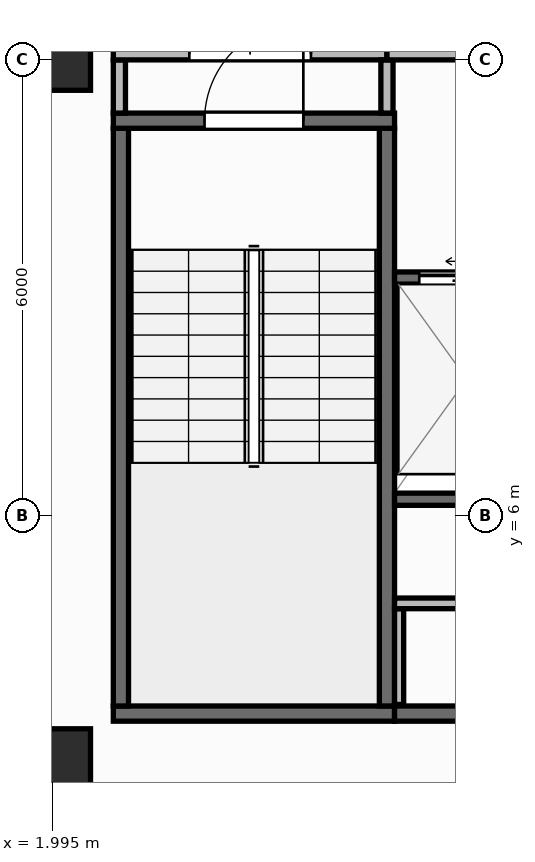
"""IFC4 building model, lengths in metres.
Left out: names, types, materials, properties, quantities, classifications, styles, units other than length and angle.
Written with IfcOpenShell. Run it as: python <this file> out.ifc"""

import sys

from ifc_helpers import new_model, si_unit, direction, frame, frame_2d, origin, origin_2d, place, context, subcontext, project, spatial, rectangle, extrude, element, fill, save


model = new_model("IFC4")
c1 = context("Model", 3, precision=1e-05, world=origin(), true_north=direction((0.0, 1.0)))
c2 = subcontext(c1, "Body", "Model", "MODEL_VIEW")
j1 = project(units=[si_unit("LENGTHUNIT", "METRE"), si_unit("PLANEANGLEUNIT", "RADIAN")], contexts=[c1])
p1 = place(None, origin())
s1 = spatial("IfcSite", under=j1, at=p1, CompositionType="ELEMENT")
p2 = place(p1, origin())
s2 = spatial("IfcBuilding", under=s1, at=p2, CompositionType="ELEMENT")
p3 = place(p2, frame((0.0, 0.0, 256.55)))
s3 = spatial("IfcBuildingStorey", under=s2, at=p3, CompositionType="ELEMENT", Elevation=256.55)
for number, where, z_axis, x_axis in (
    (1, (2.1, 2.8, 0.0), (0.0, 0.0, 1.0), (1.0, 0.0, 0.0)),
    (2, (2.1, 12.0, 0.0), (0.0, 0.0, 1.0), (1.0, 0.0, 0.0)),
):
    element("IfcColumn", number, at=place(p3, frame(where, z_axis=z_axis, x_axis=x_axis)), inside=s3, PredefinedType="COLUMN", context=c2, shape_type="SweptSolid", body=[
        extrude(rectangle(XDim=0.8, YDim=0.8, at=origin_2d()), origin(), (0.0, 0.0, 1.0), 3.95),
    ])
p4 = place(p3, frame((2.56, 0.173, 0.0), z_axis=(0.0, 0.0, 1.0), x_axis=(0.996798206282, 0.079958338856, 0.0)))
e3 = element("IfcWall", 3, at=p4, inside=s3, PredefinedType="STANDARD", context=c2, shape_type="SweptSolid", body=[
    extrude(rectangle(XDim=37.199, YDim=0.26, at=frame_2d((18.6, 0.0))), origin(), (0.0, 0.0, 1.0), 3.71),
])
p5 = place(p4, frame((17.4, 0.0, 0.9)))
e4 = element("IfcOpeningElement", 4, at=p5, cuts=e3, PredefinedType="OPENING", context=c2, shape_type="SweptSolid", body=[
    extrude(rectangle(XDim=2.4, YDim=1.65, at=frame_2d((1.2, 0.825))), frame((0.0, 0.14, 0.0), z_axis=(0.0, -1.0, 0.0), x_axis=(1.0, 0.0, 0.0)), (0.0, 0.0, 1.0), 0.28),
])
p6 = place(p3, frame((2.8, 3.4, 0.0), z_axis=(0.0, 0.0, 1.0), x_axis=(1.0, 0.0, 0.0)))
e5 = element("IfcWall", 5, at=p6, inside=s3, PredefinedType="SHEAR", context=c2, shape_type="SweptSolid", body=[
    extrude(rectangle(XDim=3.7, YDim=0.2, at=frame_2d((1.85, 0.0))), origin(), (0.0, 0.0, 1.0), 3.71),
])
for number, where, z_axis, x_axis in (
    (6, (2.9, 3.5, 0.0), (0.0, 0.0, 1.0), (0.0, 1.0, 0.0)),
    (7, (6.4, 3.5, 0.0), (0.0, 0.0, 1.0), (0.0, 1.0, 0.0)),
):
    element("IfcWall", number, at=place(p3, frame(where, z_axis=z_axis, x_axis=x_axis)), inside=s3, PredefinedType="SHEAR", context=c2, shape_type="SweptSolid", body=[
        extrude(rectangle(XDim=7.6, YDim=0.2, at=frame_2d((3.8, 0.0))), origin(), (0.0, 0.0, 1.0), 3.71),
    ])
p7 = place(p3, frame((2.8, 11.2, 0.0), z_axis=(0.0, 0.0, 1.0), x_axis=(1.0, 0.0, 0.0)))
e8 = element("IfcWall", 8, at=p7, inside=s3, PredefinedType="SHEAR", context=c2, shape_type="SweptSolid", body=[
    extrude(rectangle(XDim=3.7, YDim=0.2, at=frame_2d((1.85, 0.0))), origin(), (0.0, 0.0, 1.0), 3.71),
])
p8 = place(p7, frame((1.2, 0.0, 0.0)))
e9 = element("IfcOpeningElement", 9, at=p8, cuts=e8, PredefinedType="OPENING", context=c2, shape_type="SweptSolid", body=[
    extrude(rectangle(XDim=1.3, YDim=2.15, at=frame_2d((0.65, 1.075))), frame((0.0, 0.11, 0.0), z_axis=(0.0, -1.0, 0.0), x_axis=(1.0, 0.0, 0.0)), (0.0, 0.0, 1.0), 0.22),
])
p9 = place(p3, frame((6.5, 3.4, 0.0), z_axis=(0.0, 0.0, 1.0), x_axis=(1.0, 0.0, 0.0)))
e10 = element("IfcWall", 10, at=p9, inside=s3, PredefinedType="SHEAR", context=c2, shape_type="SweptSolid", body=[
    extrude(rectangle(XDim=13.7, YDim=0.2, at=frame_2d((6.85, 0.0))), origin(), (0.0, 0.0, 1.0), 3.71),
])
p10 = place(p3, frame((6.5, 6.22, 0.0), z_axis=(0.0, 0.0, 1.0), x_axis=(1.0, 0.0, 0.0)))
e11 = element("IfcWall", 11, at=p10, inside=s3, PredefinedType="SHEAR", context=c2, shape_type="SweptSolid", body=[
    extrude(rectangle(XDim=12.11, YDim=0.16, at=frame_2d((6.055, 0.0))), origin(), (0.0, 0.0, 1.0), 3.71),
])
p11 = place(p3, frame((6.5, 9.13, 0.0), z_axis=(0.0, 0.0, 1.0), x_axis=(1.0, 0.0, 0.0)))
e12 = element("IfcWall", 12, at=p11, inside=s3, PredefinedType="SHEAR", context=c2, shape_type="SweptSolid", body=[
    extrude(rectangle(XDim=1.975, YDim=0.16, at=frame_2d((0.988, 0.0))), origin(), (0.0, 0.0, 1.0), 3.71),
])
p12 = place(p11, frame((0.325, 0.0, 0.0)))
e13 = element("IfcOpeningElement", 13, at=p12, cuts=e12, PredefinedType="OPENING", context=c2, shape_type="SweptSolid", body=[
    extrude(rectangle(XDim=1.25, YDim=2.15, at=frame_2d((0.625, 1.075))), frame((0.0, 0.09, 0.0), z_axis=(0.0, -1.0, 0.0), x_axis=(1.0, 0.0, 0.0)), (0.0, 0.0, 1.0), 0.18),
])
p13 = place(p3, frame((6.56, 3.52, 0.0), z_axis=(0.0, 0.0, 1.0), x_axis=(0.0, 1.0, 0.0)))
e14 = element("IfcWall", 14, at=p13, inside=s3, PredefinedType="PARTITIONING", context=c2, shape_type="SweptSolid", body=[
    extrude(rectangle(XDim=1.26, YDim=0.12, at=frame_2d((0.63, 0.0))), origin(), (0.0, 0.0, 1.0), 3.71),
])
p14 = place(p3, frame((6.5, 4.85, 0.0), z_axis=(0.0, 0.0, 1.0), x_axis=(1.0, 0.0, 0.0)))
e15 = element("IfcWall", 15, at=p14, inside=s3, PredefinedType="PARTITIONING", context=c2, shape_type="SweptSolid", body=[
    extrude(rectangle(XDim=5.67, YDim=0.14, at=frame_2d((2.835, 0.0))), origin(), (0.0, 0.0, 1.0), 3.71),
])
p15 = place(p14, frame((2.285, 0.0, 0.0)))
e16 = element("IfcOpeningElement", 16, at=p15, cuts=e15, PredefinedType="OPENING", context=c2, shape_type="SweptSolid", body=[
    extrude(rectangle(XDim=1.1, YDim=2.1, at=frame_2d((0.55, 1.05))), frame((0.0, 0.08, 0.0), z_axis=(0.0, -1.0, 0.0), x_axis=(1.0, 0.0, 0.0)), (0.0, 0.0, 1.0), 0.16),
])
p16 = place(p3, frame((2.88, 11.3, 0.0), z_axis=(0.0, 0.0, 1.0), x_axis=(0.0, 1.0, 0.0)))
e17 = element("IfcWall", 17, at=p16, inside=s3, PredefinedType="PARTITIONING", context=c2, shape_type="SweptSolid", body=[
    extrude(rectangle(XDim=0.7, YDim=0.16, at=frame_2d((0.35, 0.0))), origin(), (0.0, 0.0, 1.0), 3.71),
])
p17 = place(p3, frame((2.8, 12.08, 0.0), z_axis=(0.0, 0.0, 1.0), x_axis=(1.0, 0.0, 0.0)))
e18 = element("IfcWall", 18, at=p17, inside=s3, PredefinedType="PARTITIONING", context=c2, shape_type="SweptSolid", body=[
    extrude(rectangle(XDim=3.6, YDim=0.16, at=frame_2d((1.8, 0.0))), origin(), (0.0, 0.0, 1.0), 3.157),
])
p18 = place(p17, frame((1.0, 0.0, 0.0)))
e19 = element("IfcOpeningElement", 19, at=p18, cuts=e18, PredefinedType="OPENING", context=c2, shape_type="SweptSolid", body=[
    extrude(rectangle(XDim=1.6, YDim=2.05, at=frame_2d((0.8, 1.025))), frame((0.0, 0.09, 0.0), z_axis=(0.0, -1.0, 0.0), x_axis=(1.0, 0.0, 0.0)), (0.0, 0.0, 1.0), 0.18),
])
p19 = place(p3, frame((6.4, 11.3, 0.0), z_axis=(0.0, 0.0, 1.0), x_axis=(0.0, 1.0, 0.0)))
e20 = element("IfcWall", 20, at=p19, inside=s3, PredefinedType="PARTITIONING", context=c2, shape_type="SweptSolid", body=[
    extrude(rectangle(XDim=0.7, YDim=0.16, at=frame_2d((0.35, 0.0))), origin(), (0.0, 0.0, 1.0), 3.71),
])
p20 = place(p3, frame((6.4, 12.08, 0.0), z_axis=(0.0, 0.0, 1.0), x_axis=(1.0, 0.0, 0.0)))
e21 = element("IfcWall", 21, at=p20, inside=s3, PredefinedType="PARTITIONING", context=c2, shape_type="SweptSolid", body=[
    extrude(rectangle(XDim=6.18, YDim=0.16, at=frame_2d((3.09, 0.0))), origin(), (0.0, 0.0, 1.0), 3.157),
])
p21 = place(p20, frame((2.29, 0.0, 0.0)))
e22 = element("IfcOpeningElement", 22, at=p21, cuts=e21, PredefinedType="OPENING", context=c2, shape_type="SweptSolid", body=[
    extrude(rectangle(XDim=1.6, YDim=2.05, at=frame_2d((0.8, 1.025))), frame((0.0, 0.09, 0.0), z_axis=(0.0, -1.0, 0.0), x_axis=(1.0, 0.0, 0.0)), (0.0, 0.0, 1.0), 0.18),
])
p22 = place(p8, origin())
e23 = element("IfcDoor", 23, at=p22, inside=s3, OperationType="SINGLE_SWING_RIGHT", PredefinedType="DOOR", context=c2, shape_type="SweptSolid", body=[
    extrude(rectangle(XDim=1.3, YDim=2.15, at=frame_2d((0.65, 1.075))), frame((0.0, 0.025, 0.0), z_axis=(0.0, -1.0, 0.0), x_axis=(1.0, 0.0, 0.0)), (0.0, 0.0, 1.0), 0.05),
])
fill(e9, e23)
p23 = place(p12, origin())
e24 = element("IfcDoor", 24, at=p23, inside=s3, OperationType="SLIDING_TO_LEFT", PredefinedType="DOOR", context=c2, shape_type="SweptSolid", body=[
    extrude(rectangle(XDim=1.25, YDim=2.15, at=frame_2d((0.625, 1.075))), frame((0.0, 0.025, 0.0), z_axis=(0.0, -1.0, 0.0), x_axis=(1.0, 0.0, 0.0)), (0.0, 0.0, 1.0), 0.05),
])
fill(e13, e24)
p24 = place(p18, origin())
e25 = element("IfcDoor", 25, at=p24, inside=s3, OperationType="DOUBLE_DOOR_SINGLE_SWING", PredefinedType="DOOR", context=c2, shape_type="SweptSolid", body=[
    extrude(rectangle(XDim=1.6, YDim=2.05, at=frame_2d((0.8, 1.025))), frame((0.0, 0.025, 0.0), z_axis=(0.0, -1.0, 0.0), x_axis=(1.0, 0.0, 0.0)), (0.0, 0.0, 1.0), 0.05),
])
fill(e19, e25)
save(model, sys.argv[1])
